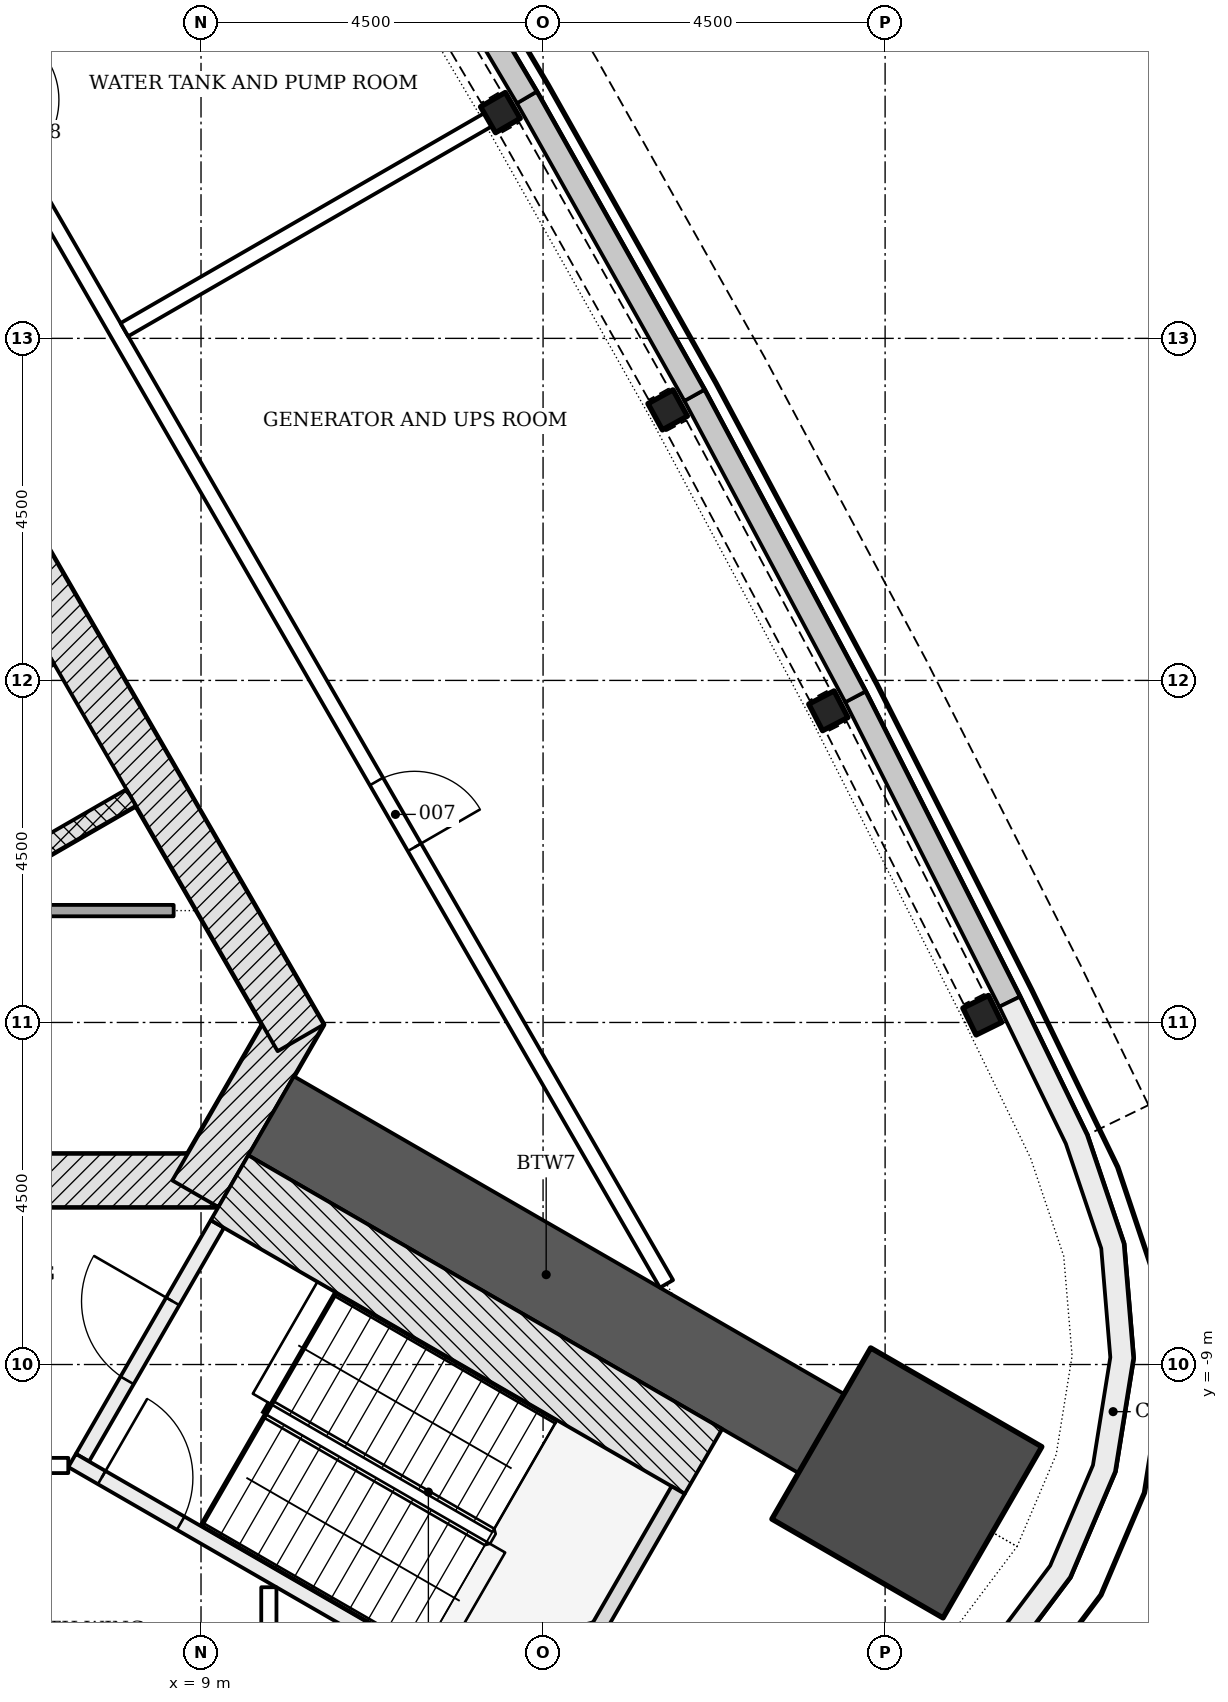
"""IFC4 building model, lengths in metres.
Left out: names, types, materials, properties, quantities, classifications, styles, units other than length and angle.
Written with IfcOpenShell. Run it as: python <this file> out.ifc"""

import sys

from ifc_helpers import new_model, si_unit, direction, frame, frame_2d, origin, origin_2d, place, context, subcontext, project, spatial, polyline, rectangle, i_section, outline, extrude, element, fill, save


model = new_model("IFC4")
c1 = context("Model", 3, precision=1e-05, world=origin(), true_north=direction((0.0, 1.0)))
c2 = subcontext(c1, "Body", "Model", "MODEL_VIEW")
j1 = project(units=[si_unit("LENGTHUNIT", "METRE"), si_unit("PLANEANGLEUNIT", "RADIAN")], contexts=[c1])
p1 = place(None, origin())
s1 = spatial("IfcSite", under=j1, at=p1, CompositionType="ELEMENT")
p2 = place(p1, origin())
s2 = spatial("IfcBuilding", under=s1, at=p2, CompositionType="ELEMENT")
p3 = place(p2, frame((0.0, 0.0, 210.3)))
s3 = spatial("IfcBuildingStorey", under=s2, at=p3, CompositionType="ELEMENT", Elevation=210.3)
p4 = place(p3, frame((-9.229, -6.578, -0.3), z_axis=(0.0, 0.0, 1.0), x_axis=(1.0, 0.0, 0.0)))
e1 = element("IfcWall", 1, at=p4, inside=s3, PredefinedType="SHEAR", context=c2, shape_type="SweptSolid", body=[
    extrude(rectangle(XDim=18.458, YDim=0.7, at=frame_2d((9.229, 0.0))), origin(), (0.0, 0.0, 1.0), 4.6),
])
p5 = place(p4, frame((8.7, 0.0, 0.3)))
e2 = element("IfcOpeningElement", 2, at=p5, cuts=e1, PredefinedType="OPENING", context=c2, shape_type="SweptSolid", body=[
    extrude(rectangle(XDim=1.0, YDim=2.1, at=frame_2d((0.5, 1.05))), frame((0.0, 0.36, 0.0), z_axis=(0.0, -1.0, 0.0), x_axis=(1.0, 0.0, 0.0)), (0.0, 0.0, 1.0), 0.72),
])
p6 = place(p4, frame((3.99, 0.0, 0.3)))
e3 = element("IfcOpeningElement", 3, at=p6, cuts=e1, PredefinedType="OPENING", context=c2, shape_type="SweptSolid", body=[
    extrude(rectangle(XDim=0.9, YDim=2.1, at=frame_2d((0.45, 1.05))), frame((0.0, 0.36, 0.0), z_axis=(0.0, -1.0, 0.0), x_axis=(1.0, 0.0, 0.0)), (0.0, 0.0, 1.0), 0.72),
])
p7 = place(p4, frame((13.539, 0.0, 0.3)))
e4 = element("IfcOpeningElement", 4, at=p7, cuts=e1, PredefinedType="OPENING", context=c2, shape_type="SweptSolid", body=[
    extrude(rectangle(XDim=0.9, YDim=2.1, at=frame_2d((0.45, 1.05))), frame((0.0, 0.36, 0.0), z_axis=(0.0, -1.0, 0.0), x_axis=(1.0, 0.0, 0.0)), (0.0, 0.0, 1.0), 0.72),
])
p8 = place(p3, frame((8.926, -6.753, -0.3), z_axis=(0.0, 0.0, 1.0), x_axis=(0.500042739161, 0.866000726912, 0.0)))
e5 = element("IfcWall", 5, at=p8, inside=s3, PredefinedType="SHEAR", context=c2, shape_type="SweptSolid", body=[
    extrude(rectangle(XDim=2.771, YDim=0.7, at=frame_2d((1.386, 0.0))), origin(), (0.0, 0.0, 1.0), 4.6),
])
p9 = place(p3, frame((10.311, -4.703, -0.3), z_axis=(0.0, 0.0, 1.0), x_axis=(-0.500001446645, 0.866024568562, 0.0)))
e6 = element("IfcWall", 6, at=p9, inside=s3, PredefinedType="SHEAR", context=c2, shape_type="SweptSolid", body=[
    extrude(rectangle(XDim=18.458, YDim=0.7, at=frame_2d((9.229, 0.0))), origin(), (0.0, 0.0, 1.0), 4.6),
])
p10 = place(p3, frame((9.922, -5.728, -0.3), z_axis=(0.0, 0.0, 1.0), x_axis=(0.866030911543, -0.499990460161, 0.0)))
e7 = element("IfcWall", 7, at=p10, inside=s3, PredefinedType="SHEAR", context=c2, shape_type="SweptSolid", body=[
    extrude(rectangle(XDim=8.359, YDim=1.2, at=frame_2d((4.179, 0.0))), origin(), (0.0, 0.0, 1.0), 4.6),
])
p11 = place(p3, frame((18.286, -10.558, -0.3), z_axis=(0.0, 0.0, 1.0), x_axis=(0.866025403784, -0.5, 0.0)))
e8 = element("IfcColumn", 8, at=p11, inside=s3, PredefinedType="COLUMN", context=c2, shape_type="SweptSolid", body=[
    extrude(rectangle(XDim=2.6, YDim=2.6, at=origin_2d()), origin(), (0.0, 0.0, 1.0), 4.6),
])
for number, where, z_axis, x_axis in (
    (9, (19.279, -4.404, -0.3), (0.0, 0.0, 1.0), (-0.441, 0.897, 0.0)),
    (10, (17.253, -0.4, -0.3), (0.0, 0.0, 1.0), (-0.461, 0.887, 0.0)),
    (11, (15.14, 3.559, -0.3), (0.0, 0.0, 1.0), (-0.481, 0.877, 0.0)),
    (12, (12.939, 7.47, -0.3), (0.0, 0.0, 1.0), (-0.5, 0.866, 0.0)),
):
    element("IfcColumn", number, at=place(p3, frame(where, z_axis=z_axis, x_axis=x_axis)), inside=s3, PredefinedType="COLUMN", context=c2, shape_type="SweptSolid", body=[
        extrude(i_section(OverallWidth=0.394, OverallDepth=0.376, WebThickness=0.017, FlangeThickness=0.028, FilletRadius=0.015, at=origin_2d()), origin(), (0.0, 0.0, 1.0), 4.6),
    ])
p12 = place(p3, origin())
e13 = element("IfcWall", 13, at=p12, inside=s3, PredefinedType="NOTDEFINED", context=c2, shape_type="SweptSolid", body=[
    extrude(outline(polyline([(19.772, -4.162), (17.741, -0.146), (17.473, -0.281), (19.504, -4.297), (19.772, -4.162)])), origin(), (0.0, 0.0, 1.0), 1.2),
])
p13 = place(p3, origin())
e14 = element("IfcWall", 14, at=p13, inside=s3, PredefinedType="NOTDEFINED", context=c2, shape_type="SweptSolid", body=[
    extrude(outline(polyline([(17.741, -0.146), (15.622, 3.823), (15.357, 3.682), (17.477, -0.287), (17.741, -0.146)])), origin(), (0.0, 0.0, 1.0), 1.2),
])
p14 = place(p3, origin())
e15 = element("IfcWall", 15, at=p14, inside=s3, PredefinedType="NOTDEFINED", context=c2, shape_type="SweptSolid", body=[
    extrude(outline(polyline([(15.622, 3.823), (13.415, 7.745), (13.154, 7.598), (15.36, 3.677), (15.622, 3.823)])), origin(), (0.0, 0.0, 1.0), 1.2),
])
p15 = place(p3, origin())
e16 = element("IfcWall", 16, at=p15, inside=s3, PredefinedType="NOTDEFINED", context=c2, shape_type="SweptSolid", body=[
    extrude(outline(polyline([(13.415, 7.745), (11.122, 11.617), (10.864, 11.464), (13.157, 7.592), (13.415, 7.745)])), origin(), (0.0, 0.0, 1.0), 1.2),
])
p16 = place(p3, origin())
e17 = element("IfcWall", 17, at=p16, inside=s3, PredefinedType="NOTDEFINED", context=c2, shape_type="SweptSolid", body=[
    extrude(outline(polyline([(13.49, -15.042), (15.507, -14.898), (16.988, -14.602), (18.354, -13.958), (19.526, -13.004), (20.434, -11.797), (21.025, -10.408), (21.265, -8.917), (21.139, -7.411), (20.656, -5.98), (19.772, -4.162), (19.502, -4.293), (20.378, -6.094), (20.844, -7.473), (20.963, -8.905), (20.735, -10.324), (20.172, -11.646), (19.308, -12.795), (18.193, -13.702), (16.893, -14.315), (15.467, -14.6), (13.469, -14.743), (13.49, -15.042)])), origin(), (0.0, 0.0, 1.0), 4.3),
])
for number, where, z_axis, x_axis in (
    (18, (8.081, -1.541, -0.3), (0.0, 0.0, 1.0), (-0.866, -0.5, 0.0)),
    (19, (7.006, 0.321, -0.3), (0.0, 0.0, 1.0), (-0.866, -0.5, 0.0)),
):
    element("IfcWall", number, at=place(p3, frame(where, z_axis=z_axis, x_axis=x_axis)), inside=s3, PredefinedType="PARTITIONING", context=c2, shape_type="SweptSolid", body=[
        extrude(rectangle(XDim=2.5, YDim=0.25, at=frame_2d((1.25, 0.0))), origin(), (0.0, 0.0, 1.0), 4.6),
    ])
p17 = place(p3, frame((1.071, -3.028, 0.0), z_axis=(0.0, 0.0, 1.0), x_axis=(1.0, 0.0, 0.0)))
e20 = element("IfcWall", 20, at=p17, inside=s3, PredefinedType="PARTITIONING", context=c2, shape_type="SweptSolid", body=[
    extrude(rectangle(XDim=7.569, YDim=0.15, at=frame_2d((3.784, 0.0))), origin(), (0.0, 0.0, 1.0), 4.3),
])
p18 = place(p3, frame((7.44, -10.226, -0.3), z_axis=(0.0, 0.0, 1.0), x_axis=(0.500022077904, 0.866012656725, 0.0)))
e21 = element("IfcWall", 21, at=p18, inside=s3, PredefinedType="SHEAR", context=c2, shape_type="SweptSolid", body=[
    extrude(rectangle(XDim=3.55, YDim=0.2, at=frame_2d((1.775, 0.0))), origin(), (0.0, 0.0, 1.0), 4.6),
])
p19 = place(p18, frame((1.175, 0.0, 0.3)))
e22 = element("IfcOpeningElement", 22, at=p19, cuts=e21, PredefinedType="OPENING", context=c2, shape_type="SweptSolid", body=[
    extrude(rectangle(XDim=1.2, YDim=2.1, at=frame_2d((0.6, 1.05))), frame((0.0, 0.11, 0.0), z_axis=(0.0, -1.0, 0.0), x_axis=(1.0, 0.0, 0.0)), (0.0, 0.0, 1.0), 0.22),
])
p20 = place(p3, frame((7.304, -10.262, -0.3), z_axis=(0.0, 0.0, 1.0), x_axis=(0.866026594901, -0.49999793692, 0.0)))
e23 = element("IfcWall", 23, at=p20, inside=s3, PredefinedType="SHEAR", context=c2, shape_type="SweptSolid", body=[
    extrude(rectangle(XDim=5.6, YDim=0.2, at=frame_2d((2.8, 0.0))), origin(), (0.0, 0.0, 1.0), 4.6),
])
p21 = place(p20, frame((0.45, 0.0, 0.3)))
e24 = element("IfcOpeningElement", 24, at=p21, cuts=e23, PredefinedType="OPENING", context=c2, shape_type="SweptSolid", body=[
    extrude(rectangle(XDim=1.2, YDim=2.1, at=frame_2d((0.6, 1.05))), frame((0.0, 0.11, 0.0), z_axis=(0.0, -1.0, 0.0), x_axis=(1.0, 0.0, 0.0)), (0.0, 0.0, 1.0), 0.22),
])
p22 = place(p3, frame((9.375, -6.675, -0.3), z_axis=(0.0, 0.0, 1.0), x_axis=(0.866026919366, -0.499997374926, 0.0)))
e25 = element("IfcWall", 25, at=p22, inside=s3, PredefinedType="SHEAR", context=c2, shape_type="SweptSolid", body=[
    extrude(rectangle(XDim=7.2, YDim=0.986, at=frame_2d((3.6, 0.0))), origin(), (0.0, 0.0, 1.0), 4.6),
])
p23 = place(p3, frame((0.0, 0.0, -0.3)))
e26 = element("IfcWall", 26, at=p23, inside=s3, PredefinedType="SHEAR", context=c2, shape_type="SweptSolid", body=[
    extrude(outline(polyline([(12.104, -13.149), (14.289, -12.563), (15.364, -10.701), (15.191, -10.601), (14.157, -12.392), (12.132, -12.934), (12.204, -12.976), (12.204, -12.976), (12.204, -12.976), (12.204, -12.976), (12.204, -12.976), (12.204, -12.976), (12.204, -12.976), (12.204, -12.976), (12.204, -12.976), (12.204, -12.976), (12.204, -12.976), (12.204, -12.976), (12.204, -12.976), (12.204, -12.976), (12.204, -12.976), (12.204, -12.976), (12.204, -12.976), (12.104, -13.149)])), origin(), (0.0, 0.0, 1.0), 4.6),
])
p24 = place(p3, frame((5.1, -10.328, 0.0), z_axis=(0.0, 0.0, 1.0), x_axis=(1.0, 0.0, 0.0)))
e27 = element("IfcWall", 27, at=p24, inside=s3, PredefinedType="PARTITIONING", context=c2, shape_type="SweptSolid", body=[
    extrude(rectangle(XDim=2.154, YDim=0.2, at=frame_2d((1.077, 0.0))), origin(), (0.0, 0.0, 1.0), 4.3),
])
p25 = place(p24, frame((0.615, 0.0, 0.0)))
e28 = element("IfcOpeningElement", 28, at=p25, cuts=e27, PredefinedType="OPENING", context=c2, shape_type="SweptSolid", body=[
    extrude(rectangle(XDim=1.2, YDim=2.1, at=frame_2d((0.6, 1.05))), frame((0.0, 0.11, 0.0), z_axis=(0.0, -1.0, 0.0), x_axis=(1.0, 0.0, 0.0)), (0.0, 0.0, 1.0), 0.22),
])
p26 = place(p3, frame((9.893, -13.25, 0.0), z_axis=(0.0, 0.0, 1.0), x_axis=(0.0, 1.0, 0.0)))
e29 = element("IfcWall", 29, at=p26, inside=s3, PredefinedType="PARTITIONING", context=c2, shape_type="SweptSolid", body=[
    extrude(rectangle(XDim=1.32, YDim=0.2, at=frame_2d((0.66, 0.0))), origin(), (0.0, 0.0, 1.0), 4.3),
])
p27 = place(p3, frame((5.455, 8.808, 0.0), z_axis=(0.0, 0.0, 1.0), x_axis=(0.49999276215, -0.866029582519, 0.0)))
e30 = element("IfcWall", 30, at=p27, inside=s3, PredefinedType="PARTITIONING", context=c2, shape_type="SweptSolid", body=[
    extrude(rectangle(XDim=19.337, YDim=0.2, at=frame_2d((9.668, 0.0))), origin(), (0.0, 0.0, 1.0), 3.752),
])
p28 = place(p27, frame((11.705, 0.0, 0.0)))
e31 = element("IfcOpeningElement", 31, at=p28, cuts=e30, PredefinedType="OPENING", context=c2, shape_type="SweptSolid", body=[
    extrude(rectangle(XDim=1.0, YDim=2.1, at=frame_2d((0.5, 1.05))), frame((0.0, 0.11, 0.0), z_axis=(0.0, -1.0, 0.0), x_axis=(1.0, 0.0, 0.0)), (0.0, 0.0, 1.0), 0.22),
])
p29 = place(p27, frame((1.351, 0.0, 0.0)))
e32 = element("IfcOpeningElement", 32, at=p29, cuts=e30, PredefinedType="OPENING", context=c2, shape_type="SweptSolid", body=[
    extrude(rectangle(XDim=1.0, YDim=2.1, at=frame_2d((0.5, 1.05))), frame((0.0, 0.11, 0.0), z_axis=(0.0, -1.0, 0.0), x_axis=(1.0, 0.0, 0.0)), (0.0, 0.0, 1.0), 0.22),
])
p30 = place(p3, frame((7.992, 4.614, 0.0), z_axis=(0.0, 0.0, 1.0), x_axis=(0.866008693241, 0.500028942393, 0.0)))
e33 = element("IfcWall", 33, at=p30, inside=s3, PredefinedType="PARTITIONING", context=c2, shape_type="SweptSolid", body=[
    extrude(rectangle(XDim=5.562, YDim=0.2, at=frame_2d((2.781, 0.0))), origin(), (0.0, 0.0, 1.0), 3.752),
])
p31 = place(p19, origin())
e34 = element("IfcDoor", 34, at=p31, inside=s3, OperationType="SINGLE_SWING_RIGHT", PredefinedType="DOOR", context=c2, shape_type="SweptSolid", body=[
    extrude(rectangle(XDim=1.2, YDim=2.1, at=frame_2d((0.6, 1.05))), frame((0.0, 0.025, 0.0), z_axis=(0.0, -1.0, 0.0), x_axis=(1.0, 0.0, 0.0)), (0.0, 0.0, 1.0), 0.05),
])
fill(e22, e34)
p32 = place(p21, origin())
e35 = element("IfcDoor", 35, at=p32, inside=s3, OperationType="SINGLE_SWING_LEFT", PredefinedType="DOOR", context=c2, shape_type="SweptSolid", body=[
    extrude(rectangle(XDim=1.2, YDim=2.1, at=frame_2d((0.6, 1.05))), frame((0.0, 0.025, 0.0), z_axis=(0.0, -1.0, 0.0), x_axis=(1.0, 0.0, 0.0)), (0.0, 0.0, 1.0), 0.05),
])
fill(e24, e35)
p33 = place(p28, origin())
e36 = element("IfcDoor", 36, at=p33, inside=s3, OperationType="SINGLE_SWING_RIGHT", PredefinedType="DOOR", context=c2, shape_type="SweptSolid", body=[
    extrude(rectangle(XDim=1.0, YDim=2.1, at=frame_2d((0.5, 1.05))), frame((0.0, 0.025, 0.0), z_axis=(0.0, -1.0, 0.0), x_axis=(1.0, 0.0, 0.0)), (0.0, 0.0, 1.0), 0.05),
])
fill(e31, e36)
save(model, sys.argv[1])
